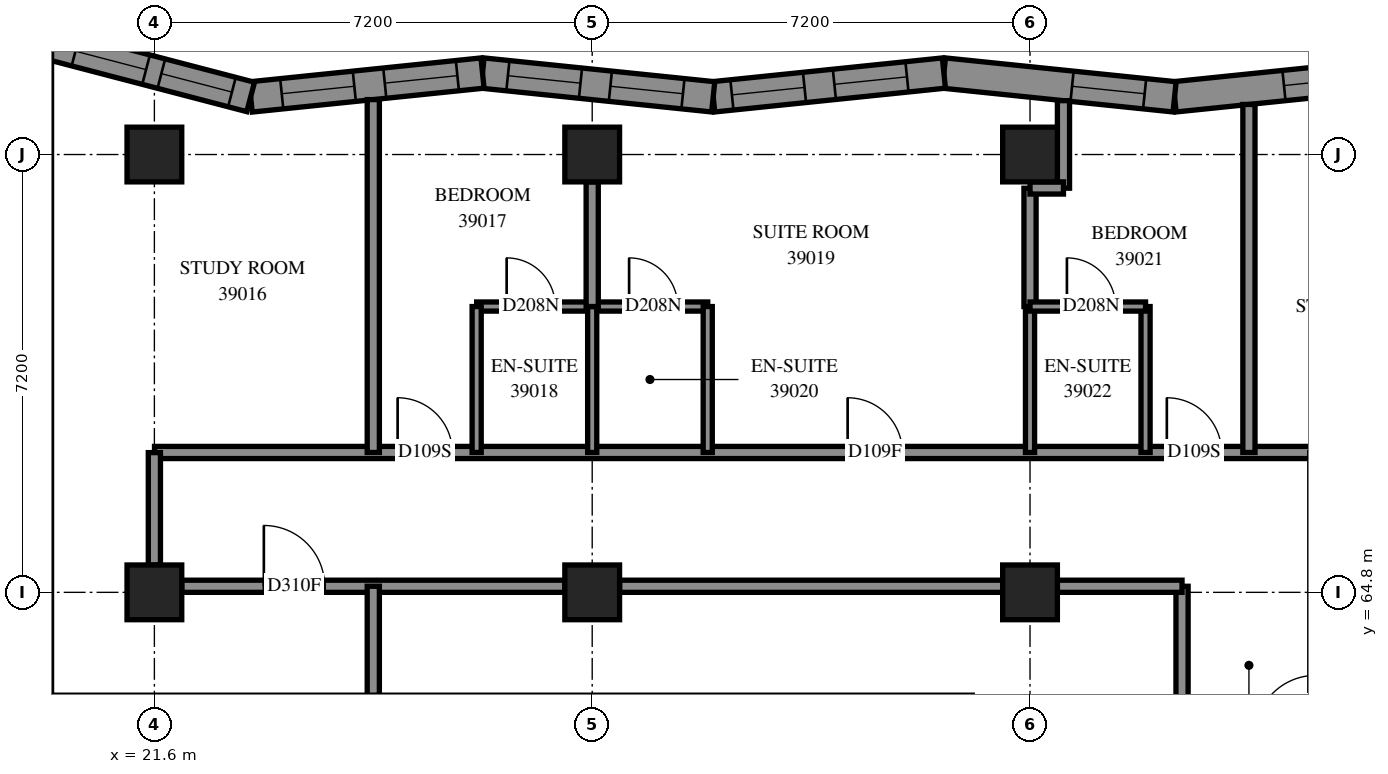
"""IFC4 building model, lengths in metres.
Left out: names, types, materials, properties, quantities, classifications, styles, units other than length and angle.
Written with IfcOpenShell. Run it as: python <this file> out.ifc"""

import sys

from ifc_helpers import new_model, si_unit, direction, frame, frame_2d, origin, origin_2d, place, context, subcontext, project, spatial, polyline, rectangle, outline, extrude, element, fill, save


model = new_model("IFC4")
c1 = context("Model", 3, precision=1e-05, world=origin(), true_north=direction((0.0, 1.0)))
c2 = subcontext(c1, "Body", "Model", "MODEL_VIEW")
j1 = project(units=[si_unit("LENGTHUNIT", "METRE"), si_unit("PLANEANGLEUNIT", "RADIAN")], contexts=[c1])
p1 = place(None, origin())
s1 = spatial("IfcSite", under=j1, at=p1, CompositionType="ELEMENT")
p2 = place(p1, origin())
s2 = spatial("IfcBuilding", under=s1, at=p2, CompositionType="ELEMENT")
p3 = place(p2, frame((0.0, 0.0, 145.6)))
s3 = spatial("IfcBuildingStorey", under=s2, at=p3, CompositionType="ELEMENT", Elevation=145.6)
for number, where, z_axis, x_axis in (
    (1, (21.6, 64.8, 0.0), (0.0, 0.0, 1.0), (1.0, 0.0, 0.0)),
    (2, (21.6, 72.0, 0.0), (0.0, 0.0, 1.0), (1.0, 0.0, 0.0)),
    (3, (28.8, 64.8, 0.0), (0.0, 0.0, 1.0), (1.0, 0.0, 0.0)),
    (4, (28.8, 72.0, 0.0), (0.0, 0.0, 1.0), (1.0, 0.0, 0.0)),
    (5, (36.0, 64.8, 0.0), (0.0, 0.0, 1.0), (1.0, 0.0, 0.0)),
    (6, (36.0, 72.0, 0.0), (0.0, 0.0, 1.0), (1.0, 0.0, 0.0)),
):
    element("IfcColumn", number, at=place(p3, frame(where, z_axis=z_axis, x_axis=x_axis)), inside=s3, PredefinedType="COLUMN", context=c2, shape_type="SweptSolid", body=[
        extrude(rectangle(XDim=0.9, YDim=0.9, at=origin_2d()), origin(), (0.0, 0.0, 1.0), 3.1),
    ])
p4 = place(p3, frame((42.171, 73.34, 0.0), z_axis=(0.0, 0.0, 1.0), x_axis=(-0.9947306832, -0.1025225234, 0.0)))
e7 = element("IfcWall", 7, at=p4, inside=s3, PredefinedType="SOLIDWALL", context=c2, shape_type="SweptSolid", body=[
    extrude(outline(polyline([(-0.026, -0.25), (3.788, -0.25), (3.84, 0.25), (0.026, 0.25), (-0.026, -0.25)])), origin(), (0.0, 0.0, 1.0), 3.1),
])
p5 = place(p4, frame((0.805, 0.0, 0.45)))
e8 = element("IfcOpeningElement", 8, at=p5, cuts=e7, PredefinedType="OPENING", context=c2, shape_type="SweptSolid", body=[
    extrude(rectangle(XDim=1.2, YDim=2.5, at=frame_2d((0.6, 1.25))), frame((0.0, 0.26, 0.0), z_axis=(0.0, -1.0, 0.0), x_axis=(1.0, 0.0, 0.0)), (0.0, 0.0, 1.0), 0.52),
])
p6 = place(p3, frame((38.377, 72.949, 0.0), z_axis=(0.0, 0.0, 1.0), x_axis=(-0.9947306832, 0.1025225234, 0.0)))
e9 = element("IfcWall", 9, at=p6, inside=s3, PredefinedType="SOLIDWALL", context=c2, shape_type="SweptSolid", body=[
    extrude(outline(polyline([(0.026, -0.25), (3.84, -0.25), (3.788, 0.25), (-0.026, 0.25), (0.026, -0.25)])), origin(), (0.0, 0.0, 1.0), 3.1),
])
p7 = place(p6, frame((0.495, 0.0, 0.45)))
e10 = element("IfcOpeningElement", 10, at=p7, cuts=e9, PredefinedType="OPENING", context=c2, shape_type="SweptSolid", body=[
    extrude(rectangle(XDim=1.2, YDim=2.5, at=frame_2d((0.6, 1.25))), frame((0.0, 0.26, 0.0), z_axis=(0.0, -1.0, 0.0), x_axis=(1.0, 0.0, 0.0)), (0.0, 0.0, 1.0), 0.52),
])
p8 = place(p3, frame((34.584, 73.34, 0.0), z_axis=(0.0, 0.0, 1.0), x_axis=(-0.9947304076, -0.1025251975, 0.0)))
e11 = element("IfcWall", 11, at=p8, inside=s3, PredefinedType="SOLIDWALL", context=c2, shape_type="SweptSolid", body=[
    extrude(outline(polyline([(-0.026, -0.25), (3.788, -0.25), (3.84, 0.25), (0.026, 0.25), (-0.026, -0.25)])), origin(), (0.0, 0.0, 1.0), 3.1),
])
p9 = place(p8, frame((0.611, 0.0, 0.45)))
e12 = element("IfcOpeningElement", 12, at=p9, cuts=e11, PredefinedType="OPENING", context=c2, shape_type="SweptSolid", body=[
    extrude(rectangle(XDim=1.2, YDim=2.5, at=frame_2d((0.6, 1.25))), frame((0.0, 0.26, 0.0), z_axis=(0.0, -1.0, 0.0), x_axis=(1.0, 0.0, 0.0)), (0.0, 0.0, 1.0), 0.52),
])
p10 = place(p8, frame((2.304, 0.0, 0.45)))
e13 = element("IfcOpeningElement", 13, at=p10, cuts=e11, PredefinedType="OPENING", context=c2, shape_type="SweptSolid", body=[
    extrude(rectangle(XDim=1.2, YDim=2.5, at=frame_2d((0.6, 1.25))), frame((0.0, 0.26, 0.0), z_axis=(0.0, -1.0, 0.0), x_axis=(1.0, 0.0, 0.0)), (0.0, 0.0, 1.0), 0.52),
])
p11 = place(p3, frame((30.79, 72.949, 0.0), z_axis=(0.0, 0.0, 1.0), x_axis=(-0.9947306832, 0.1025225234, 0.0)))
e14 = element("IfcWall", 14, at=p11, inside=s3, PredefinedType="SOLIDWALL", context=c2, shape_type="SweptSolid", body=[
    extrude(outline(polyline([(0.026, -0.25), (3.84, -0.25), (3.788, 0.25), (-0.026, 0.25), (0.026, -0.25)])), origin(), (0.0, 0.0, 1.0), 3.1),
])
p12 = place(p11, frame((0.5, 0.0, 0.45)))
e15 = element("IfcOpeningElement", 15, at=p12, cuts=e14, PredefinedType="OPENING", context=c2, shape_type="SweptSolid", body=[
    extrude(rectangle(XDim=1.2, YDim=2.5, at=frame_2d((0.6, 1.25))), frame((0.0, 0.26, 0.0), z_axis=(0.0, -1.0, 0.0), x_axis=(1.0, 0.0, 0.0)), (0.0, 0.0, 1.0), 0.52),
])
p13 = place(p11, frame((2.194, 0.0, 0.45)))
e16 = element("IfcOpeningElement", 16, at=p13, cuts=e14, PredefinedType="OPENING", context=c2, shape_type="SweptSolid", body=[
    extrude(rectangle(XDim=1.2, YDim=2.5, at=frame_2d((0.6, 1.25))), frame((0.0, 0.26, 0.0), z_axis=(0.0, -1.0, 0.0), x_axis=(1.0, 0.0, 0.0)), (0.0, 0.0, 1.0), 0.52),
])
p14 = place(p3, frame((26.996, 73.34, 0.0), z_axis=(0.0, 0.0, 1.0), x_axis=(-0.994730395, -0.10252532, 0.0)))
e17 = element("IfcWall", 17, at=p14, inside=s3, PredefinedType="SOLIDWALL", context=c2, shape_type="SweptSolid", body=[
    extrude(outline(polyline([(-0.026, -0.25), (3.788, -0.25), (3.878, 0.25), (0.026, 0.25), (-0.026, -0.25)])), origin(), (0.0, 0.0, 1.0), 3.1),
])
p15 = place(p14, frame((0.416, 0.0, 0.45)))
e18 = element("IfcOpeningElement", 18, at=p15, cuts=e17, PredefinedType="OPENING", context=c2, shape_type="SweptSolid", body=[
    extrude(rectangle(XDim=1.2, YDim=2.5, at=frame_2d((0.6, 1.25))), frame((0.0, 0.26, 0.0), z_axis=(0.0, -1.0, 0.0), x_axis=(1.0, 0.0, 0.0)), (0.0, 0.0, 1.0), 0.52),
])
p16 = place(p14, frame((2.119, 0.0, 0.45)))
e19 = element("IfcOpeningElement", 19, at=p16, cuts=e17, PredefinedType="OPENING", context=c2, shape_type="SweptSolid", body=[
    extrude(rectangle(XDim=1.2, YDim=2.5, at=frame_2d((0.6, 1.25))), frame((0.0, 0.26, 0.0), z_axis=(0.0, -1.0, 0.0), x_axis=(1.0, 0.0, 0.0)), (0.0, 0.0, 1.0), 0.52),
])
p17 = place(p3, frame((23.183, 72.947, 0.0), z_axis=(0.0, 0.0, 1.0), x_axis=(-0.9675355908, 0.2527348026, 0.0)))
e20 = element("IfcWall", 20, at=p17, inside=s3, PredefinedType="SOLIDWALL", context=c2, shape_type="SweptSolid", body=[
    extrude(outline(polyline([(0.045, -0.25), (3.966, -0.25), (3.319, 0.25), (-0.045, 0.25), (0.045, -0.25)])), origin(), (0.0, 0.0, 1.0), 3.1),
])
p18 = place(p17, frame((0.318, 0.0, 0.45)))
e21 = element("IfcOpeningElement", 21, at=p18, cuts=e20, PredefinedType="OPENING", context=c2, shape_type="SweptSolid", body=[
    extrude(rectangle(XDim=1.2, YDim=2.5, at=frame_2d((0.6, 1.25))), frame((0.0, 0.26, 0.0), z_axis=(0.0, -1.0, 0.0), x_axis=(1.0, 0.0, 0.0)), (0.0, 0.0, 1.0), 0.52),
])
p19 = place(p17, frame((1.778, 0.0, 0.45)))
e22 = element("IfcOpeningElement", 22, at=p19, cuts=e20, PredefinedType="OPENING", context=c2, shape_type="SweptSolid", body=[
    extrude(rectangle(XDim=1.2, YDim=2.5, at=frame_2d((0.6, 1.25))), frame((0.0, 0.26, 0.0), z_axis=(0.0, -1.0, 0.0), x_axis=(1.0, 0.0, 0.0)), (0.0, 0.0, 1.0), 0.52),
])
p20 = place(p3, frame((21.602, 67.1, 0.0), z_axis=(0.0, 0.0, 1.0), x_axis=(1.0, 0.0, 0.0)))
e23 = element("IfcWall", 23, at=p20, inside=s3, PredefinedType="PARTITIONING", context=c2, shape_type="SweptSolid", body=[
    extrude(rectangle(XDim=19.098, YDim=0.2, at=frame_2d((9.549, 0.0))), origin(), (0.0, 0.0, 1.0), 3.1),
])
p21 = place(p20, frame((3.998, 0.0, 0.0)))
e24 = element("IfcOpeningElement", 24, at=p21, cuts=e23, PredefinedType="OPENING", context=c2, shape_type="SweptSolid", body=[
    extrude(rectangle(XDim=0.9, YDim=2.1, at=frame_2d((0.45, 1.05))), frame((0.0, 0.11, 0.0), z_axis=(0.0, -1.0, 0.0), x_axis=(1.0, 0.0, 0.0)), (0.0, 0.0, 1.0), 0.22),
])
p22 = place(p20, frame((11.399, 0.0, 0.0)))
e25 = element("IfcOpeningElement", 25, at=p22, cuts=e23, PredefinedType="OPENING", context=c2, shape_type="SweptSolid", body=[
    extrude(rectangle(XDim=0.9, YDim=2.1, at=frame_2d((0.45, 1.05))), frame((0.0, 0.11, 0.0), z_axis=(0.0, -1.0, 0.0), x_axis=(1.0, 0.0, 0.0)), (0.0, 0.0, 1.0), 0.22),
])
p23 = place(p20, frame((16.648, 0.0, 0.0)))
e26 = element("IfcOpeningElement", 26, at=p23, cuts=e23, PredefinedType="OPENING", context=c2, shape_type="SweptSolid", body=[
    extrude(rectangle(XDim=0.9, YDim=2.1, at=frame_2d((0.45, 1.05))), frame((0.0, 0.11, 0.0), z_axis=(0.0, -1.0, 0.0), x_axis=(1.0, 0.0, 0.0)), (0.0, 0.0, 1.0), 0.22),
])
p24 = place(p3, frame((22.05, 64.9, 0.0), z_axis=(0.0, 0.0, 1.0), x_axis=(1.0, 0.0, 0.0)))
e27 = element("IfcWall", 27, at=p24, inside=s3, PredefinedType="PARTITIONING", context=c2, shape_type="SweptSolid", body=[
    extrude(rectangle(XDim=6.3, YDim=0.2, at=frame_2d((3.15, 0.0))), origin(), (0.0, 0.0, 1.0), 2.6),
])
p25 = place(p24, frame((1.35, 0.0, 0.0)))
e28 = element("IfcOpeningElement", 28, at=p25, cuts=e27, PredefinedType="OPENING", context=c2, shape_type="SweptSolid", body=[
    extrude(rectangle(XDim=1.0, YDim=2.1, at=frame_2d((0.5, 1.05))), frame((0.0, 0.11, 0.0), z_axis=(0.0, -1.0, 0.0), x_axis=(1.0, 0.0, 0.0)), (0.0, 0.0, 1.0), 0.22),
])
p26 = place(p3, frame((29.25, 64.9, 0.0), z_axis=(0.0, 0.0, 1.0), x_axis=(1.0, 0.0, 0.0)))
e29 = element("IfcWall", 29, at=p26, inside=s3, PredefinedType="PARTITIONING", context=c2, shape_type="SweptSolid", body=[
    extrude(rectangle(XDim=6.3, YDim=0.2, at=frame_2d((3.15, 0.0))), origin(), (0.0, 0.0, 1.0), 2.6),
])
p27 = place(p3, frame((25.2, 67.1, 0.0), z_axis=(0.0, 0.0, 1.0), x_axis=(0.0, 1.0, 0.0)))
e30 = element("IfcWall", 30, at=p27, inside=s3, PredefinedType="PARTITIONING", context=c2, shape_type="SweptSolid", body=[
    extrude(rectangle(XDim=5.803, YDim=0.2, at=frame_2d((2.902, 0.0))), origin(), (0.0, 0.0, 1.0), 3.1),
])
p28 = place(p3, frame((39.6, 67.1, 0.0), z_axis=(0.0, 0.0, 1.0), x_axis=(0.0, 1.0, 0.0)))
e31 = element("IfcWall", 31, at=p28, inside=s3, PredefinedType="PARTITIONING", context=c2, shape_type="SweptSolid", body=[
    extrude(rectangle(XDim=5.723, YDim=0.2, at=frame_2d((2.862, 0.0))), origin(), (0.0, 0.0, 1.0), 3.1),
])
p29 = place(p3, frame((26.9, 69.5, 0.0), z_axis=(0.0, 0.0, 1.0), x_axis=(1.0, 0.0, 0.0)))
e32 = element("IfcWall", 32, at=p29, inside=s3, PredefinedType="PARTITIONING", context=c2, shape_type="SweptSolid", body=[
    extrude(rectangle(XDim=3.8, YDim=0.15, at=frame_2d((1.9, 0.0))), origin(), (0.0, 0.0, 1.0), 3.1),
])
p30 = place(p29, frame((0.493, 0.0, 0.0)))
e33 = element("IfcOpeningElement", 33, at=p30, cuts=e32, PredefinedType="OPENING", context=c2, shape_type="SweptSolid", body=[
    extrude(rectangle(XDim=0.8, YDim=2.1, at=frame_2d((0.4, 1.05))), frame((0.0, 0.085, 0.0), z_axis=(0.0, -1.0, 0.0), x_axis=(1.0, 0.0, 0.0)), (0.0, 0.0, 1.0), 0.17),
])
p31 = place(p29, frame((2.507, 0.0, 0.0)))
e34 = element("IfcOpeningElement", 34, at=p31, cuts=e32, PredefinedType="OPENING", context=c2, shape_type="SweptSolid", body=[
    extrude(rectangle(XDim=0.8, YDim=2.1, at=frame_2d((0.4, 1.05))), frame((0.0, 0.085, 0.0), z_axis=(0.0, -1.0, 0.0), x_axis=(1.0, 0.0, 0.0)), (0.0, 0.0, 1.0), 0.17),
])
p32 = place(p3, frame((38.5, 62.302, 0.0), z_axis=(0.0, 0.0, 1.0), x_axis=(0.0, 1.0, 0.0)))
e35 = element("IfcWall", 35, at=p32, inside=s3, PredefinedType="PARTITIONING", context=c2, shape_type="SweptSolid", body=[
    extrude(rectangle(XDim=2.598, YDim=0.2, at=frame_2d((1.299, 0.0))), origin(), (0.0, 0.0, 1.0), 3.1),
])
for number, where, z_axis, x_axis in (
    (36, (26.9, 67.1, 0.0), (0.0, 0.0, 1.0), (0.0, 1.0, 0.0)),
    (37, (28.8, 67.1, 0.0), (0.0, 0.0, 1.0), (0.0, 1.0, 0.0)),
    (38, (30.7, 67.1, 0.0), (0.0, 0.0, 1.0), (0.0, 1.0, 0.0)),
    (39, (36.0, 67.1, 0.0), (0.0, 0.0, 1.0), (0.0, 1.0, 0.0)),
    (40, (37.9, 67.1, 0.0), (0.0, 0.0, 1.0), (0.0, 1.0, 0.0)),
):
    element("IfcWall", number, at=place(p3, frame(where, z_axis=z_axis, x_axis=x_axis)), inside=s3, PredefinedType="PARTITIONING", context=c2, shape_type="SweptSolid", body=[
        extrude(rectangle(XDim=2.4, YDim=0.15, at=frame_2d((1.2, 0.0))), origin(), (0.0, 0.0, 1.0), 3.1),
    ])
for number, where, z_axis, x_axis in (
    (41, (36.45, 64.9, 0.0), (0.0, 0.0, 1.0), (1.0, 0.0, 0.0)),
    (42, (28.8, 69.5, 0.0), (0.0, 0.0, 1.0), (0.0, 1.0, 0.0)),
):
    element("IfcWall", number, at=place(p3, frame(where, z_axis=z_axis, x_axis=x_axis)), inside=s3, PredefinedType="PARTITIONING", context=c2, shape_type="SweptSolid", body=[
        extrude(rectangle(XDim=2.05, YDim=0.2, at=frame_2d((1.025, 0.0))), origin(), (0.0, 0.0, 1.0), 3.1),
    ])
p33 = place(p3, frame((36.0, 69.5, 0.0), z_axis=(0.0, 0.0, 1.0), x_axis=(0.0, 1.0, 0.0)))
e43 = element("IfcWall", 43, at=p33, inside=s3, PredefinedType="PARTITIONING", context=c2, shape_type="SweptSolid", body=[
    extrude(rectangle(XDim=1.946, YDim=0.2, at=frame_2d((0.973, 0.0))), origin(), (0.0, 0.0, 1.0), 3.1),
])
p34 = place(p3, frame((36.0, 69.5, 0.0), z_axis=(0.0, 0.0, 1.0), x_axis=(1.0, 0.0, 0.0)))
e44 = element("IfcWall", 44, at=p34, inside=s3, PredefinedType="PARTITIONING", context=c2, shape_type="SweptSolid", body=[
    extrude(rectangle(XDim=1.9, YDim=0.15, at=frame_2d((0.95, 0.0))), origin(), (0.0, 0.0, 1.0), 3.1),
])
p35 = place(p34, frame((0.607, 0.0, 0.0)))
e45 = element("IfcOpeningElement", 45, at=p35, cuts=e44, PredefinedType="OPENING", context=c2, shape_type="SweptSolid", body=[
    extrude(rectangle(XDim=0.8, YDim=2.1, at=frame_2d((0.4, 1.05))), frame((0.0, 0.085, 0.0), z_axis=(0.0, -1.0, 0.0), x_axis=(1.0, 0.0, 0.0)), (0.0, 0.0, 1.0), 0.17),
])
p36 = place(p3, frame((21.6, 65.25, 0.0), z_axis=(0.0, 0.0, 1.0), x_axis=(0.0, 1.0, 0.0)))
e46 = element("IfcWall", 46, at=p36, inside=s3, PredefinedType="PARTITIONING", context=c2, shape_type="SweptSolid", body=[
    extrude(rectangle(XDim=1.848, YDim=0.2, at=frame_2d((0.924, 0.0))), origin(), (0.0, 0.0, 1.0), 2.6),
])
p37 = place(p3, frame((25.2, 63.109, 0.0), z_axis=(0.0, 0.0, 1.0), x_axis=(0.0, 1.0, 0.0)))
e47 = element("IfcWall", 47, at=p37, inside=s3, PredefinedType="PARTITIONING", context=c2, shape_type="SweptSolid", body=[
    extrude(rectangle(XDim=1.791, YDim=0.2, at=frame_2d((0.895, 0.0))), origin(), (0.0, 0.0, 1.0), 3.1),
])
p38 = place(p3, frame((36.55, 71.446, 0.0), z_axis=(0.0, 0.0, 1.0), x_axis=(0.0, 1.0, 0.0)))
e48 = element("IfcWall", 48, at=p38, inside=s3, PredefinedType="PARTITIONING", context=c2, shape_type="SweptSolid", body=[
    extrude(rectangle(XDim=1.44, YDim=0.2, at=frame_2d((0.72, 0.0))), origin(), (0.0, 0.0, 1.0), 3.1),
])
p39 = place(p3, frame((36.0, 71.45, 0.0), z_axis=(0.0, 0.0, 1.0), x_axis=(1.0, 0.0, 0.0)))
e49 = element("IfcWall", 49, at=p39, inside=s3, PredefinedType="PARTITIONING", context=c2, shape_type="SweptSolid", body=[
    extrude(rectangle(XDim=0.55, YDim=0.2, at=frame_2d((0.275, 0.0))), origin(), (0.0, 0.0, 1.0), 3.1),
])
p40 = place(p5, origin())
e50 = element("IfcWindow", 50, at=p40, inside=s3, PartitioningType="SINGLE_PANEL", PredefinedType="WINDOW", context=c2, shape_type="SweptSolid", body=[
    extrude(rectangle(XDim=1.2, YDim=2.5, at=frame_2d((0.6, 1.25))), frame((0.0, 0.18, 0.0), z_axis=(0.0, -1.0, 0.0), x_axis=(1.0, 0.0, 0.0)), (0.0, 0.0, 1.0), 0.06),
])
fill(e8, e50)
p41 = place(p7, origin())
e51 = element("IfcWindow", 51, at=p41, inside=s3, PartitioningType="SINGLE_PANEL", PredefinedType="WINDOW", context=c2, shape_type="SweptSolid", body=[
    extrude(rectangle(XDim=1.2, YDim=2.5, at=frame_2d((0.6, 1.25))), frame((0.0, 0.18, 0.0), z_axis=(0.0, -1.0, 0.0), x_axis=(1.0, 0.0, 0.0)), (0.0, 0.0, 1.0), 0.06),
])
fill(e10, e51)
p42 = place(p9, origin())
e52 = element("IfcWindow", 52, at=p42, inside=s3, PartitioningType="SINGLE_PANEL", PredefinedType="WINDOW", context=c2, shape_type="SweptSolid", body=[
    extrude(rectangle(XDim=1.2, YDim=2.5, at=frame_2d((0.6, 1.25))), frame((0.0, 0.18, 0.0), z_axis=(0.0, -1.0, 0.0), x_axis=(1.0, 0.0, 0.0)), (0.0, 0.0, 1.0), 0.06),
])
fill(e12, e52)
p43 = place(p10, origin())
e53 = element("IfcWindow", 53, at=p43, inside=s3, PartitioningType="SINGLE_PANEL", PredefinedType="WINDOW", context=c2, shape_type="SweptSolid", body=[
    extrude(rectangle(XDim=1.2, YDim=2.5, at=frame_2d((0.6, 1.25))), frame((0.0, 0.18, 0.0), z_axis=(0.0, -1.0, 0.0), x_axis=(1.0, 0.0, 0.0)), (0.0, 0.0, 1.0), 0.06),
])
fill(e13, e53)
p44 = place(p12, origin())
e54 = element("IfcWindow", 54, at=p44, inside=s3, PartitioningType="SINGLE_PANEL", PredefinedType="WINDOW", context=c2, shape_type="SweptSolid", body=[
    extrude(rectangle(XDim=1.2, YDim=2.5, at=frame_2d((0.6, 1.25))), frame((0.0, 0.18, 0.0), z_axis=(0.0, -1.0, 0.0), x_axis=(1.0, 0.0, 0.0)), (0.0, 0.0, 1.0), 0.06),
])
fill(e15, e54)
p45 = place(p13, origin())
e55 = element("IfcWindow", 55, at=p45, inside=s3, PartitioningType="SINGLE_PANEL", PredefinedType="WINDOW", context=c2, shape_type="SweptSolid", body=[
    extrude(rectangle(XDim=1.2, YDim=2.5, at=frame_2d((0.6, 1.25))), frame((0.0, 0.18, 0.0), z_axis=(0.0, -1.0, 0.0), x_axis=(1.0, 0.0, 0.0)), (0.0, 0.0, 1.0), 0.06),
])
fill(e16, e55)
p46 = place(p15, origin())
e56 = element("IfcWindow", 56, at=p46, inside=s3, PartitioningType="SINGLE_PANEL", PredefinedType="WINDOW", context=c2, shape_type="SweptSolid", body=[
    extrude(rectangle(XDim=1.2, YDim=2.5, at=frame_2d((0.6, 1.25))), frame((0.0, 0.18, 0.0), z_axis=(0.0, -1.0, 0.0), x_axis=(1.0, 0.0, 0.0)), (0.0, 0.0, 1.0), 0.06),
])
fill(e18, e56)
p47 = place(p16, origin())
e57 = element("IfcWindow", 57, at=p47, inside=s3, PartitioningType="SINGLE_PANEL", PredefinedType="WINDOW", context=c2, shape_type="SweptSolid", body=[
    extrude(rectangle(XDim=1.2, YDim=2.5, at=frame_2d((0.6, 1.25))), frame((0.0, 0.18, 0.0), z_axis=(0.0, -1.0, 0.0), x_axis=(1.0, 0.0, 0.0)), (0.0, 0.0, 1.0), 0.06),
])
fill(e19, e57)
p48 = place(p18, origin())
e58 = element("IfcWindow", 58, at=p48, inside=s3, PartitioningType="SINGLE_PANEL", PredefinedType="WINDOW", context=c2, shape_type="SweptSolid", body=[
    extrude(rectangle(XDim=1.2, YDim=2.5, at=frame_2d((0.6, 1.25))), frame((0.0, 0.18, 0.0), z_axis=(0.0, -1.0, 0.0), x_axis=(1.0, 0.0, 0.0)), (0.0, 0.0, 1.0), 0.06),
])
fill(e21, e58)
p49 = place(p19, origin())
e59 = element("IfcWindow", 59, at=p49, inside=s3, PartitioningType="SINGLE_PANEL", PredefinedType="WINDOW", context=c2, shape_type="SweptSolid", body=[
    extrude(rectangle(XDim=1.2, YDim=2.5, at=frame_2d((0.6, 1.25))), frame((0.0, 0.18, 0.0), z_axis=(0.0, -1.0, 0.0), x_axis=(1.0, 0.0, 0.0)), (0.0, 0.0, 1.0), 0.06),
])
fill(e22, e59)
p50 = place(p25, origin())
e60 = element("IfcDoor", 60, at=p50, inside=s3, OperationType="SINGLE_SWING_RIGHT", PredefinedType="DOOR", context=c2, shape_type="SweptSolid", body=[
    extrude(rectangle(XDim=1.0, YDim=2.1, at=frame_2d((0.5, 1.05))), frame((0.0, 0.025, 0.0), z_axis=(0.0, -1.0, 0.0), x_axis=(1.0, 0.0, 0.0)), (0.0, 0.0, 1.0), 0.05),
])
fill(e28, e60)
p51 = place(p21, origin())
e61 = element("IfcDoor", 61, at=p51, inside=s3, OperationType="SINGLE_SWING_LEFT", PredefinedType="DOOR", context=c2, shape_type="SweptSolid", body=[
    extrude(rectangle(XDim=0.9, YDim=2.1, at=frame_2d((0.45, 1.05))), frame((0.0, 0.025, 0.0), z_axis=(0.0, -1.0, 0.0), x_axis=(1.0, 0.0, 0.0)), (0.0, 0.0, 1.0), 0.05),
])
fill(e24, e61)
p52 = place(p30, origin())
e62 = element("IfcDoor", 62, at=p52, inside=s3, OperationType="SINGLE_SWING_RIGHT", PredefinedType="DOOR", context=c2, shape_type="SweptSolid", body=[
    extrude(rectangle(XDim=0.8, YDim=2.1, at=frame_2d((0.4, 1.05))), frame((0.0, 0.025, 0.0), z_axis=(0.0, -1.0, 0.0), x_axis=(1.0, 0.0, 0.0)), (0.0, 0.0, 1.0), 0.05),
])
fill(e33, e62)
p53 = place(p22, origin())
e63 = element("IfcDoor", 63, at=p53, inside=s3, OperationType="SINGLE_SWING_RIGHT", PredefinedType="DOOR", context=c2, shape_type="SweptSolid", body=[
    extrude(rectangle(XDim=0.9, YDim=2.1, at=frame_2d((0.45, 1.05))), frame((0.0, 0.025, 0.0), z_axis=(0.0, -1.0, 0.0), x_axis=(1.0, 0.0, 0.0)), (0.0, 0.0, 1.0), 0.05),
])
fill(e25, e63)
p54 = place(p31, origin())
e64 = element("IfcDoor", 64, at=p54, inside=s3, OperationType="SINGLE_SWING_RIGHT", PredefinedType="DOOR", context=c2, shape_type="SweptSolid", body=[
    extrude(rectangle(XDim=0.8, YDim=2.1, at=frame_2d((0.4, 1.05))), frame((0.0, 0.025, 0.0), z_axis=(0.0, -1.0, 0.0), x_axis=(1.0, 0.0, 0.0)), (0.0, 0.0, 1.0), 0.05),
])
fill(e34, e64)
p55 = place(p23, origin())
e65 = element("IfcDoor", 65, at=p55, inside=s3, OperationType="SINGLE_SWING_RIGHT", PredefinedType="DOOR", context=c2, shape_type="SweptSolid", body=[
    extrude(rectangle(XDim=0.9, YDim=2.1, at=frame_2d((0.45, 1.05))), frame((0.0, 0.025, 0.0), z_axis=(0.0, -1.0, 0.0), x_axis=(1.0, 0.0, 0.0)), (0.0, 0.0, 1.0), 0.05),
])
fill(e26, e65)
p56 = place(p35, origin())
e66 = element("IfcDoor", 66, at=p56, inside=s3, OperationType="SINGLE_SWING_RIGHT", PredefinedType="DOOR", context=c2, shape_type="SweptSolid", body=[
    extrude(rectangle(XDim=0.8, YDim=2.1, at=frame_2d((0.4, 1.05))), frame((0.0, 0.025, 0.0), z_axis=(0.0, -1.0, 0.0), x_axis=(1.0, 0.0, 0.0)), (0.0, 0.0, 1.0), 0.05),
])
fill(e45, e66)
save(model, sys.argv[1])
